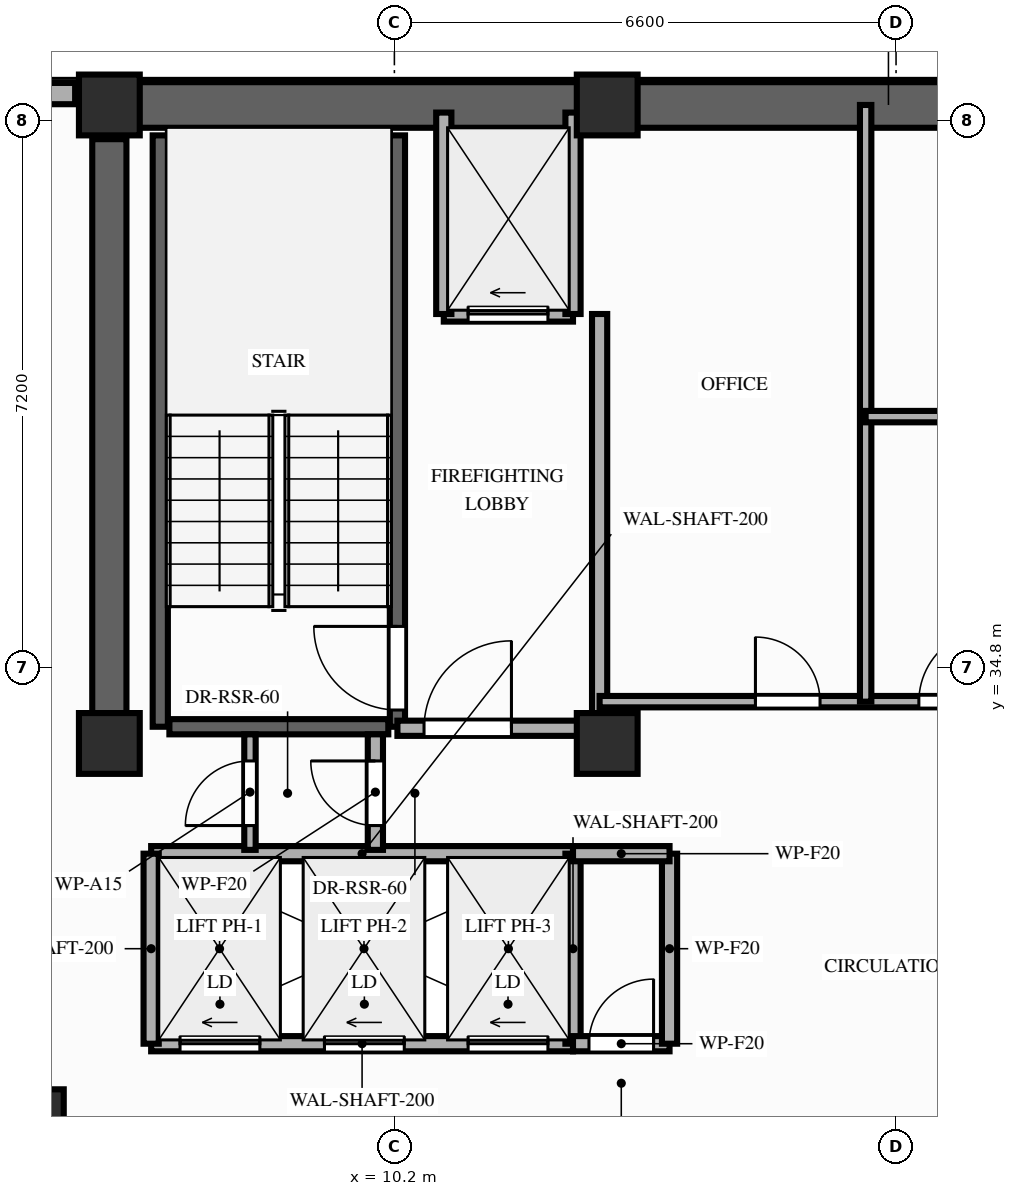
"""IFC4 building model, lengths in metres.
Left out: names, types, materials, properties, quantities, classifications, styles, units other than length and angle.
Written with IfcOpenShell. Run it as: python <this file> out.ifc"""

import sys

from ifc_helpers import new_model, si_unit, direction, frame, frame_2d, origin, origin_2d, place, context, subcontext, project, spatial, rectangle, extrude, element, fill, save


model = new_model("IFC4")
c1 = context("Model", 3, precision=1e-05, world=origin(), true_north=direction((0.0, 1.0)))
c2 = subcontext(c1, "Body", "Model", "MODEL_VIEW")
j1 = project(units=[si_unit("LENGTHUNIT", "METRE"), si_unit("PLANEANGLEUNIT", "RADIAN")], contexts=[c1])
p1 = place(None, origin())
s1 = spatial("IfcSite", under=j1, at=p1, CompositionType="ELEMENT")
p2 = place(p1, origin())
s2 = spatial("IfcBuilding", under=s1, at=p2, CompositionType="ELEMENT")
p3 = place(p2, frame((0.0, 0.0, 192.0)))
s3 = spatial("IfcBuildingStorey", under=s2, at=p3, CompositionType="ELEMENT", Elevation=192.0)
for number, where, z_axis, x_axis in (
    (1, (6.45, 33.8, 0.0), (0.0, 0.0, 1.0), (1.0, 0.0, 0.0)),
    (2, (13.0, 33.8, 0.0), (0.0, 0.0, 1.0), (1.0, 0.0, 0.0)),
    (3, (6.45, 42.2, 0.0), (0.0, 0.0, 1.0), (1.0, 0.0, 0.0)),
    (4, (13.0, 42.2, 0.0), (0.0, 0.0, 1.0), (1.0, 0.0, 0.0)),
):
    element("IfcColumn", number, at=place(p3, frame(where, z_axis=z_axis, x_axis=x_axis)), inside=s3, PredefinedType="COLUMN", context=c2, shape_type="SweptSolid", body=[
        extrude(rectangle(XDim=0.8, YDim=0.8, at=origin_2d()), origin(), (0.0, 0.0, 1.0), 3.2),
    ])
p4 = place(p3, frame((5.4, 28.8, 0.0), z_axis=(0.0, 0.0, 1.0), x_axis=(1.0, 0.0, 0.0)))
e5 = element("IfcColumn", 5, at=p4, inside=s3, PredefinedType="COLUMN", context=c2, shape_type="SweptSolid", body=[
    extrude(rectangle(XDim=0.9, YDim=0.9, at=origin_2d()), origin(), (0.0, 0.0, 1.0), 3.2),
])
p5 = place(p3, frame((6.0, 42.35, 0.0), z_axis=(0.0, 0.0, 1.0), x_axis=(-1.0, 0.0, 0.0)))
e6 = element("IfcWall", 6, at=p5, inside=s3, PredefinedType="STANDARD", context=c2, shape_type="SweptSolid", body=[
    extrude(rectangle(XDim=2.0, YDim=0.28, at=frame_2d((1.0, 0.0))), origin(), (0.0, 0.0, 1.0), 3.02),
])
p6 = place(p3, frame((6.45, 42.2, 0.0), z_axis=(0.0, 0.0, 1.0), x_axis=(1.0, 0.0, 0.0)))
e7 = element("IfcWall", 7, at=p6, inside=s3, PredefinedType="SHEAR", context=c2, shape_type="SweptSolid", body=[
    extrude(rectangle(XDim=20.45, YDim=0.6, at=frame_2d((10.225, 0.0))), origin(), (0.0, 0.0, 1.0), 3.02),
])
p7 = place(p3, frame((6.45, 33.8, 0.0), z_axis=(0.0, 0.0, 1.0), x_axis=(0.0, 1.0, 0.0)))
e8 = element("IfcWall", 8, at=p7, inside=s3, PredefinedType="SHEAR", context=c2, shape_type="SweptSolid", body=[
    extrude(rectangle(XDim=7.95, YDim=0.45, at=frame_2d((3.975, 0.0))), origin(), (0.0, 0.0, 1.0), 3.02),
])
p8 = place(p3, frame((7.12, 34.02, 0.0), z_axis=(0.0, 0.0, 1.0), x_axis=(0.0, 1.0, 0.0)))
e9 = element("IfcWall", 9, at=p8, inside=s3, PredefinedType="SHEAR", context=c2, shape_type="SweptSolid", body=[
    extrude(rectangle(XDim=7.78, YDim=0.2, at=frame_2d((3.89, 0.0))), origin(), (0.0, 0.0, 1.0), 3.02),
])
p9 = place(p3, frame((10.24, 34.02, 0.0), z_axis=(0.0, 0.0, 1.0), x_axis=(0.0, 1.0, 0.0)))
e10 = element("IfcWall", 10, at=p9, inside=s3, PredefinedType="SHEAR", context=c2, shape_type="SweptSolid", body=[
    extrude(rectangle(XDim=7.78, YDim=0.2, at=frame_2d((3.89, 0.0))), origin(), (0.0, 0.0, 1.0), 3.02),
])
p10 = place(p9, frame((0.22, 0.0, 0.0)))
e11 = element("IfcOpeningElement", 11, at=p10, cuts=e10, PredefinedType="OPENING", context=c2, shape_type="SweptSolid", body=[
    extrude(rectangle(XDim=1.1, YDim=2.15, at=frame_2d((0.55, 1.075))), frame((0.0, 0.11, 0.0), z_axis=(0.0, -1.0, 0.0), x_axis=(1.0, 0.0, 0.0)), (0.0, 0.0, 1.0), 0.22),
])
p11 = place(p3, frame((7.24, 34.02, 0.0), z_axis=(0.0, 0.0, 1.0), x_axis=(1.0, 0.0, 0.0)))
e12 = element("IfcWall", 12, at=p11, inside=s3, PredefinedType="SHEAR", context=c2, shape_type="SweptSolid", body=[
    extrude(rectangle(XDim=2.88, YDim=0.2, at=frame_2d((1.44, 0.0))), origin(), (0.0, 0.0, 1.0), 3.02),
])
p12 = place(p3, frame((7.0, 29.85, 0.0), z_axis=(0.0, 0.0, 1.0), x_axis=(1.0, 0.0, 0.0)))
e13 = element("IfcWall", 13, at=p12, inside=s3, PredefinedType="MOVABLE", context=c2, shape_type="SweptSolid", body=[
    extrude(rectangle(XDim=5.55, YDim=0.2, at=frame_2d((2.775, 0.0))), origin(), (0.0, 0.0, 1.0), 3.02),
])
p13 = place(p12, frame((0.38, 0.0, 0.0)))
e14 = element("IfcOpeningElement", 14, at=p13, cuts=e13, PredefinedType="OPENING", context=c2, shape_type="SweptSolid", body=[
    extrude(rectangle(XDim=1.05, YDim=2.15, at=frame_2d((0.525, 1.075))), frame((0.0, 0.11, 0.0), z_axis=(0.0, -1.0, 0.0), x_axis=(1.0, 0.0, 0.0)), (0.0, 0.0, 1.0), 0.22),
])
p14 = place(p12, frame((2.28, 0.0, 0.0)))
e15 = element("IfcOpeningElement", 15, at=p14, cuts=e13, PredefinedType="OPENING", context=c2, shape_type="SweptSolid", body=[
    extrude(rectangle(XDim=1.05, YDim=2.15, at=frame_2d((0.525, 1.075))), frame((0.0, 0.11, 0.0), z_axis=(0.0, -1.0, 0.0), x_axis=(1.0, 0.0, 0.0)), (0.0, 0.0, 1.0), 0.22),
])
p15 = place(p12, frame((4.17, 0.0, 0.0)))
e16 = element("IfcOpeningElement", 16, at=p15, cuts=e13, PredefinedType="OPENING", context=c2, shape_type="SweptSolid", body=[
    extrude(rectangle(XDim=1.05, YDim=2.15, at=frame_2d((0.525, 1.075))), frame((0.0, 0.11, 0.0), z_axis=(0.0, -1.0, 0.0), x_axis=(1.0, 0.0, 0.0)), (0.0, 0.0, 1.0), 0.22),
])
p16 = place(p3, frame((7.0, 32.35, 0.0), z_axis=(0.0, 0.0, 1.0), x_axis=(1.0, 0.0, 0.0)))
e17 = element("IfcWall", 17, at=p16, inside=s3, PredefinedType="MOVABLE", context=c2, shape_type="SweptSolid", body=[
    extrude(rectangle(XDim=5.55, YDim=0.2, at=frame_2d((2.775, 0.0))), origin(), (0.0, 0.0, 1.0), 3.02),
])
for number, where, z_axis, x_axis in (
    (18, (7.0, 29.85, 0.0), (0.0, 0.0, 1.0), (0.0, 1.0, 0.0)),
    (19, (12.55, 29.85, 0.0), (0.0, 0.0, 1.0), (0.0, 1.0, 0.0)),
):
    element("IfcWall", number, at=place(p3, frame(where, z_axis=z_axis, x_axis=x_axis)), inside=s3, PredefinedType="MOVABLE", context=c2, shape_type="SweptSolid", body=[
        extrude(rectangle(XDim=2.5, YDim=0.2, at=frame_2d((1.25, 0.0))), origin(), (0.0, 0.0, 1.0), 3.02),
    ])
p17 = place(p3, frame((10.85, 39.45, 0.0), z_axis=(0.0, 0.0, 1.0), x_axis=(1.0, 0.0, 0.0)))
e20 = element("IfcWall", 20, at=p17, inside=s3, PredefinedType="MOVABLE", context=c2, shape_type="SweptSolid", body=[
    extrude(rectangle(XDim=1.7, YDim=0.2, at=frame_2d((0.85, 0.0))), origin(), (0.0, 0.0, 1.0), 3.02),
])
p18 = place(p17, frame((0.32, 0.0, 0.0)))
e21 = element("IfcOpeningElement", 21, at=p18, cuts=e20, PredefinedType="OPENING", context=c2, shape_type="SweptSolid", body=[
    extrude(rectangle(XDim=1.05, YDim=2.15, at=frame_2d((0.525, 1.075))), frame((0.0, 0.11, 0.0), z_axis=(0.0, -1.0, 0.0), x_axis=(1.0, 0.0, 0.0)), (0.0, 0.0, 1.0), 0.22),
])
for number, where, z_axis, x_axis in (
    (22, (10.85, 39.45, 0.0), (0.0, 0.0, 1.0), (0.0, 1.0, 0.0)),
    (23, (12.55, 39.45, 0.0), (0.0, 0.0, 1.0), (0.0, 1.0, 0.0)),
):
    element("IfcWall", number, at=place(p3, frame(where, z_axis=z_axis, x_axis=x_axis)), inside=s3, PredefinedType="MOVABLE", context=c2, shape_type="SweptSolid", body=[
        extrude(rectangle(XDim=2.65, YDim=0.2, at=frame_2d((1.325, 0.0))), origin(), (0.0, 0.0, 1.0), 2.51),
    ])
p19 = place(p3, frame((12.9, 34.0, 0.0), z_axis=(0.0, 0.0, 1.0), x_axis=(0.0, 1.0, 0.0)))
e24 = element("IfcWall", 24, at=p19, inside=s3, PredefinedType="PARTITIONING", context=c2, shape_type="SweptSolid", body=[
    extrude(rectangle(XDim=5.45, YDim=0.2, at=frame_2d((2.725, 0.0))), origin(), (0.0, 0.0, 1.0), 2.51),
])
p20 = place(p3, frame((10.24, 34.0, 0.0), z_axis=(0.0, 0.0, 1.0), x_axis=(1.0, 0.0, 0.0)))
e25 = element("IfcWall", 25, at=p20, inside=s3, PredefinedType="PARTITIONING", context=c2, shape_type="SweptSolid", body=[
    extrude(rectangle(XDim=2.66, YDim=0.2, at=frame_2d((1.33, 0.0))), origin(), (0.0, 0.0, 1.0), 2.51),
])
p21 = place(p20, frame((0.35, 0.0, 0.0)))
e26 = element("IfcOpeningElement", 26, at=p21, cuts=e25, PredefinedType="OPENING", context=c2, shape_type="SweptSolid", body=[
    extrude(rectangle(XDim=1.15, YDim=2.15, at=frame_2d((0.575, 1.075))), frame((0.0, 0.11, 0.0), z_axis=(0.0, -1.0, 0.0), x_axis=(1.0, 0.0, 0.0)), (0.0, 0.0, 1.0), 0.22),
])
p22 = place(p3, frame((9.95, 32.4, 0.0), z_axis=(0.0, 0.0, 1.0), x_axis=(0.0, 1.0, 0.0)))
e27 = element("IfcWall", 27, at=p22, inside=s3, PredefinedType="PARTITIONING", context=c2, shape_type="SweptSolid", body=[
    extrude(rectangle(XDim=1.52, YDim=0.2, at=frame_2d((0.76, 0.0))), origin(), (0.0, 0.0, 1.0), 2.51),
])
p23 = place(p22, frame((0.32, 0.0, 0.0)))
e28 = element("IfcOpeningElement", 28, at=p23, cuts=e27, PredefinedType="OPENING", context=c2, shape_type="SweptSolid", body=[
    extrude(rectangle(XDim=0.85, YDim=2.05, at=frame_2d((0.425, 1.025))), frame((0.0, 0.11, 0.0), z_axis=(0.0, -1.0, 0.0), x_axis=(1.0, 0.0, 0.0)), (0.0, 0.0, 1.0), 0.22),
])
p24 = place(p3, frame((8.3, 32.4, 0.0), z_axis=(0.0, 0.0, 1.0), x_axis=(0.0, 1.0, 0.0)))
e29 = element("IfcWall", 29, at=p24, inside=s3, PredefinedType="PARTITIONING", context=c2, shape_type="SweptSolid", body=[
    extrude(rectangle(XDim=1.52, YDim=0.15, at=frame_2d((0.76, 0.0))), origin(), (0.0, 0.0, 1.0), 2.51),
])
p25 = place(p24, frame((0.32, 0.0, 0.0)))
e30 = element("IfcOpeningElement", 30, at=p25, cuts=e29, PredefinedType="OPENING", context=c2, shape_type="SweptSolid", body=[
    extrude(rectangle(XDim=0.85, YDim=2.05, at=frame_2d((0.425, 1.025))), frame((0.0, 0.085, 0.0), z_axis=(0.0, -1.0, 0.0), x_axis=(1.0, 0.0, 0.0)), (0.0, 0.0, 1.0), 0.17),
])
p26 = place(p3, frame((12.55, 29.85, 0.0), z_axis=(0.0, 0.0, 1.0), x_axis=(1.0, 0.0, 0.0)))
e31 = element("IfcWall", 31, at=p26, inside=s3, PredefinedType="PARTITIONING", context=c2, shape_type="SweptSolid", body=[
    extrude(rectangle(XDim=1.27, YDim=0.2, at=frame_2d((0.635, 0.0))), origin(), (0.0, 0.0, 1.0), 3.02),
])
p27 = place(p26, frame((0.21, 0.0, 0.0)))
e32 = element("IfcOpeningElement", 32, at=p27, cuts=e31, PredefinedType="OPENING", context=c2, shape_type="SweptSolid", body=[
    extrude(rectangle(XDim=0.85, YDim=2.05, at=frame_2d((0.425, 1.025))), frame((0.0, 0.11, 0.0), z_axis=(0.0, -1.0, 0.0), x_axis=(1.0, 0.0, 0.0)), (0.0, 0.0, 1.0), 0.22),
])
p28 = place(p3, frame((13.82, 29.85, 0.0), z_axis=(0.0, 0.0, 1.0), x_axis=(0.0, 1.0, 0.0)))
e33 = element("IfcWall", 33, at=p28, inside=s3, PredefinedType="PARTITIONING", context=c2, shape_type="SweptSolid", body=[
    extrude(rectangle(XDim=2.5, YDim=0.2, at=frame_2d((1.25, 0.0))), origin(), (0.0, 0.0, 1.0), 3.02),
])
p29 = place(p3, frame((12.55, 32.35, 0.0), z_axis=(0.0, 0.0, 1.0), x_axis=(1.0, 0.0, 0.0)))
e34 = element("IfcWall", 34, at=p29, inside=s3, PredefinedType="PARTITIONING", context=c2, shape_type="SweptSolid", body=[
    extrude(rectangle(XDim=1.27, YDim=0.2, at=frame_2d((0.635, 0.0))), origin(), (0.0, 0.0, 1.0), 3.02),
])
p30 = place(p3, frame((12.9, 34.35, 0.0), z_axis=(0.0, 0.0, 1.0), x_axis=(1.0, 0.0, 0.0)))
e35 = element("IfcWall", 35, at=p30, inside=s3, PredefinedType="PARTITIONING", context=c2, shape_type="SweptSolid", body=[
    extrude(rectangle(XDim=7.6, YDim=0.15, at=frame_2d((3.8, 0.0))), origin(), (0.0, 0.0, 1.0), 3.02),
])
p31 = place(p30, frame((2.05, 0.0, 0.0)))
e36 = element("IfcOpeningElement", 36, at=p31, cuts=e35, PredefinedType="OPENING", context=c2, shape_type="SweptSolid", body=[
    extrude(rectangle(XDim=0.85, YDim=2.05, at=frame_2d((0.425, 1.025))), frame((0.0, 0.085, 0.0), z_axis=(0.0, -1.0, 0.0), x_axis=(1.0, 0.0, 0.0)), (0.0, 0.0, 1.0), 0.17),
])
p32 = place(p30, frame((4.2, 0.0, 0.0)))
e37 = element("IfcOpeningElement", 37, at=p32, cuts=e35, PredefinedType="OPENING", context=c2, shape_type="SweptSolid", body=[
    extrude(rectangle(XDim=0.95, YDim=2.15, at=frame_2d((0.475, 1.075))), frame((0.0, 0.085, 0.0), z_axis=(0.0, -1.0, 0.0), x_axis=(1.0, 0.0, 0.0)), (0.0, 0.0, 1.0), 0.17),
])
p33 = place(p3, frame((16.4, 34.35, 0.0), z_axis=(0.0, 0.0, 1.0), x_axis=(0.0, 1.0, 0.0)))
e38 = element("IfcWall", 38, at=p33, inside=s3, PredefinedType="PARTITIONING", context=c2, shape_type="SweptSolid", body=[
    extrude(rectangle(XDim=7.85, YDim=0.15, at=frame_2d((3.925, 0.0))), origin(), (0.0, 0.0, 1.0), 2.51),
])
p34 = place(p3, frame((16.4, 38.1, 0.0), z_axis=(0.0, 0.0, 1.0), x_axis=(1.0, 0.0, 0.0)))
e39 = element("IfcWall", 39, at=p34, inside=s3, PredefinedType="PARTITIONING", context=c2, shape_type="SweptSolid", body=[
    extrude(rectangle(XDim=4.05, YDim=0.15, at=frame_2d((2.025, 0.0))), origin(), (0.0, 0.0, 1.0), 3.02),
])
p35 = place(p34, frame((1.6, 0.0, 0.0)))
e40 = element("IfcOpeningElement", 40, at=p35, cuts=e39, PredefinedType="OPENING", context=c2, shape_type="SweptSolid", body=[
    extrude(rectangle(XDim=0.85, YDim=2.05, at=frame_2d((0.425, 1.025))), frame((0.0, 0.085, 0.0), z_axis=(0.0, -1.0, 0.0), x_axis=(1.0, 0.0, 0.0)), (0.0, 0.0, 1.0), 0.17),
])
p36 = place(p10, origin())
e41 = element("IfcDoor", 41, at=p36, inside=s3, OperationType="SINGLE_SWING_RIGHT", PredefinedType="DOOR", context=c2, shape_type="SweptSolid", body=[
    extrude(rectangle(XDim=1.1, YDim=2.15, at=frame_2d((0.55, 1.075))), frame((0.0, 0.025, 0.0), z_axis=(0.0, -1.0, 0.0), x_axis=(1.0, 0.0, 0.0)), (0.0, 0.0, 1.0), 0.05),
])
fill(e11, e41)
p37 = place(p13, origin())
e42 = element("IfcDoor", 42, at=p37, inside=s3, OperationType="SLIDING_TO_LEFT", PredefinedType="DOOR", context=c2, shape_type="SweptSolid", body=[
    extrude(rectangle(XDim=1.05, YDim=2.15, at=frame_2d((0.525, 1.075))), frame((0.0, 0.025, 0.0), z_axis=(0.0, -1.0, 0.0), x_axis=(1.0, 0.0, 0.0)), (0.0, 0.0, 1.0), 0.05),
])
fill(e14, e42)
p38 = place(p14, origin())
e43 = element("IfcDoor", 43, at=p38, inside=s3, OperationType="SLIDING_TO_LEFT", PredefinedType="DOOR", context=c2, shape_type="SweptSolid", body=[
    extrude(rectangle(XDim=1.05, YDim=2.15, at=frame_2d((0.525, 1.075))), frame((0.0, 0.025, 0.0), z_axis=(0.0, -1.0, 0.0), x_axis=(1.0, 0.0, 0.0)), (0.0, 0.0, 1.0), 0.05),
])
fill(e15, e43)
p39 = place(p15, origin())
e44 = element("IfcDoor", 44, at=p39, inside=s3, OperationType="SLIDING_TO_LEFT", PredefinedType="DOOR", context=c2, shape_type="SweptSolid", body=[
    extrude(rectangle(XDim=1.05, YDim=2.15, at=frame_2d((0.525, 1.075))), frame((0.0, 0.025, 0.0), z_axis=(0.0, -1.0, 0.0), x_axis=(1.0, 0.0, 0.0)), (0.0, 0.0, 1.0), 0.05),
])
fill(e16, e44)
p40 = place(p18, origin())
e45 = element("IfcDoor", 45, at=p40, inside=s3, OperationType="SLIDING_TO_LEFT", PredefinedType="DOOR", context=c2, shape_type="SweptSolid", body=[
    extrude(rectangle(XDim=1.05, YDim=2.15, at=frame_2d((0.525, 1.075))), frame((0.0, 0.025, 0.0), z_axis=(0.0, -1.0, 0.0), x_axis=(1.0, 0.0, 0.0)), (0.0, 0.0, 1.0), 0.05),
])
fill(e21, e45)
p41 = place(p21, origin())
e46 = element("IfcDoor", 46, at=p41, inside=s3, OperationType="SINGLE_SWING_RIGHT", PredefinedType="DOOR", context=c2, shape_type="SweptSolid", body=[
    extrude(rectangle(XDim=1.15, YDim=2.15, at=frame_2d((0.575, 1.075))), frame((0.0, 0.025, 0.0), z_axis=(0.0, -1.0, 0.0), x_axis=(1.0, 0.0, 0.0)), (0.0, 0.0, 1.0), 0.05),
])
fill(e26, e46)
p42 = place(p23, origin())
e47 = element("IfcDoor", 47, at=p42, inside=s3, OperationType="SINGLE_SWING_RIGHT", PredefinedType="DOOR", context=c2, shape_type="SweptSolid", body=[
    extrude(rectangle(XDim=0.85, YDim=2.05, at=frame_2d((0.425, 1.025))), frame((0.0, 0.025, 0.0), z_axis=(0.0, -1.0, 0.0), x_axis=(1.0, 0.0, 0.0)), (0.0, 0.0, 1.0), 0.05),
])
fill(e28, e47)
p43 = place(p25, origin())
e48 = element("IfcDoor", 48, at=p43, inside=s3, OperationType="SINGLE_SWING_LEFT", PredefinedType="DOOR", context=c2, shape_type="SweptSolid", body=[
    extrude(rectangle(XDim=0.85, YDim=2.05, at=frame_2d((0.425, 1.025))), frame((0.0, 0.025, 0.0), z_axis=(0.0, -1.0, 0.0), x_axis=(1.0, 0.0, 0.0)), (0.0, 0.0, 1.0), 0.05),
])
fill(e30, e48)
p44 = place(p27, origin())
e49 = element("IfcDoor", 49, at=p44, inside=s3, OperationType="SINGLE_SWING_RIGHT", PredefinedType="DOOR", context=c2, shape_type="SweptSolid", body=[
    extrude(rectangle(XDim=0.85, YDim=2.05, at=frame_2d((0.425, 1.025))), frame((0.0, 0.025, 0.0), z_axis=(0.0, -1.0, 0.0), x_axis=(1.0, 0.0, 0.0)), (0.0, 0.0, 1.0), 0.05),
])
fill(e32, e49)
p45 = place(p31, origin())
e50 = element("IfcDoor", 50, at=p45, inside=s3, OperationType="SINGLE_SWING_LEFT", PredefinedType="DOOR", context=c2, shape_type="SweptSolid", body=[
    extrude(rectangle(XDim=0.85, YDim=2.05, at=frame_2d((0.425, 1.025))), frame((0.0, 0.025, 0.0), z_axis=(0.0, -1.0, 0.0), x_axis=(1.0, 0.0, 0.0)), (0.0, 0.0, 1.0), 0.05),
])
fill(e36, e50)
p46 = place(p32, origin())
e51 = element("IfcDoor", 51, at=p46, inside=s3, OperationType="SINGLE_SWING_RIGHT", PredefinedType="DOOR", context=c2, shape_type="SweptSolid", body=[
    extrude(rectangle(XDim=0.95, YDim=2.15, at=frame_2d((0.475, 1.075))), frame((0.0, 0.025, 0.0), z_axis=(0.0, -1.0, 0.0), x_axis=(1.0, 0.0, 0.0)), (0.0, 0.0, 1.0), 0.05),
])
fill(e37, e51)
save(model, sys.argv[1])
